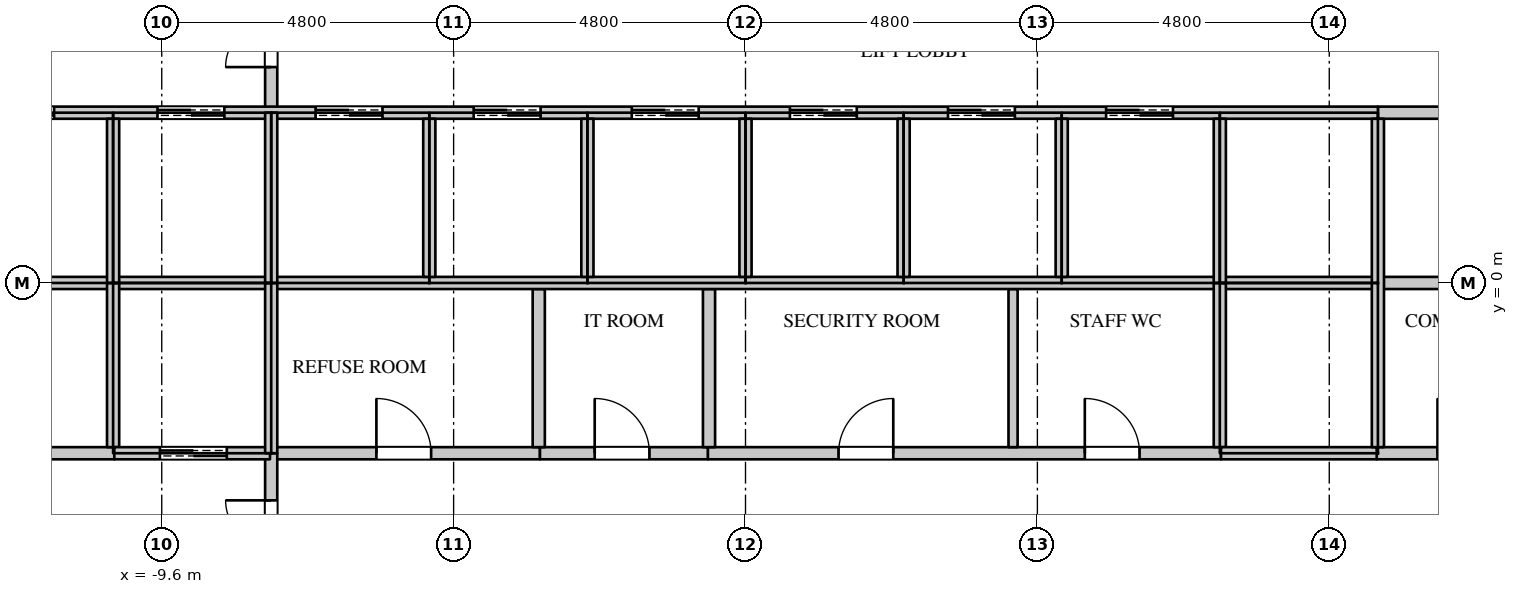
"""IFC4 building model, lengths in metres.
Left out: names, types, materials, properties, quantities, classifications, styles, units other than length and angle.
Written with IfcOpenShell. Run it as: python <this file> out.ifc"""

import sys

from ifc_helpers import new_model, si_unit, direction, frame, frame_2d, origin, place, context, subcontext, project, spatial, rectangle, extrude, element, fill, save


model = new_model("IFC4")
c1 = context("Model", 3, precision=1e-05, world=origin(), true_north=direction((0.0, 1.0)))
c2 = subcontext(c1, "Body", "Model", "MODEL_VIEW")
j1 = project(units=[si_unit("LENGTHUNIT", "METRE"), si_unit("PLANEANGLEUNIT", "RADIAN")], contexts=[c1])
p1 = place(None, origin())
s1 = spatial("IfcSite", under=j1, at=p1, CompositionType="ELEMENT")
p2 = place(p1, origin())
s2 = spatial("IfcBuilding", under=s1, at=p2, CompositionType="ELEMENT")
p3 = place(p2, frame((0.0, 0.0, 101.1)))
s3 = spatial("IfcBuildingStorey", under=s2, at=p3, CompositionType="ELEMENT", Elevation=101.1)
p4 = place(p3, frame((-7.82, -2.8, 0.0), z_axis=(0.0, 0.0, 1.0), x_axis=(1.0, 0.0, 0.0)))
e1 = element("IfcWall", 1, at=p4, inside=s3, PredefinedType="PARTITIONING", context=c2, shape_type="SweptSolid", body=[
    extrude(rectangle(XDim=4.44, YDim=0.2, at=frame_2d((2.22, 0.0))), origin(), (0.0, 0.0, 1.0), 5.15),
])
p5 = place(p4, frame((1.75, 0.0, 0.0)))
e2 = element("IfcOpeningElement", 2, at=p5, cuts=e1, PredefinedType="OPENING", context=c2, shape_type="SweptSolid", body=[
    extrude(rectangle(XDim=0.9, YDim=2.2, at=frame_2d((0.45, 1.1))), frame((0.0, 0.11, 0.0), z_axis=(0.0, -1.0, 0.0), x_axis=(1.0, 0.0, 0.0)), (0.0, 0.0, 1.0), 0.22),
])
p6 = place(p3, frame((-7.8, -8.075, 0.0), z_axis=(0.0, 0.0, 1.0), x_axis=(0.0, 1.0, 0.0)))
e3 = element("IfcWall", 3, at=p6, inside=s3, PredefinedType="PARTITIONING", context=c2, shape_type="SweptSolid", body=[
    extrude(rectangle(XDim=5.275, YDim=0.2, at=frame_2d((2.637, 0.0))), origin(), (0.0, 0.0, 1.0), 5.15),
])
p7 = place(p6, frame((3.0, 0.0, 0.0)))
e4 = element("IfcOpeningElement", 4, at=p7, cuts=e3, PredefinedType="OPENING", context=c2, shape_type="SweptSolid", body=[
    extrude(rectangle(XDim=1.5, YDim=2.4, at=frame_2d((0.75, 1.2))), frame((0.0, 0.11, 0.0), z_axis=(0.0, -1.0, 0.0), x_axis=(1.0, 0.0, 0.0)), (0.0, 0.0, 1.0), 0.22),
])
p8 = place(p3, frame((-7.8, 2.8, 0.0), z_axis=(0.0, 0.0, 1.0), x_axis=(0.0, 1.0, 0.0)))
e5 = element("IfcWall", 5, at=p8, inside=s3, PredefinedType="PARTITIONING", context=c2, shape_type="SweptSolid", body=[
    extrude(rectangle(XDim=5.275, YDim=0.2, at=frame_2d((2.637, 0.0))), origin(), (0.0, 0.0, 1.0), 5.15),
])
p9 = place(p8, frame((0.75, 0.0, 0.0)))
e6 = element("IfcOpeningElement", 6, at=p9, cuts=e5, PredefinedType="OPENING", context=c2, shape_type="SweptSolid", body=[
    extrude(rectangle(XDim=1.5, YDim=2.4, at=frame_2d((0.75, 1.2))), frame((0.0, 0.11, 0.0), z_axis=(0.0, -1.0, 0.0), x_axis=(1.0, 0.0, 0.0)), (0.0, 0.0, 1.0), 0.22),
])
p10 = place(p3, frame((-0.62, -2.8, 0.0), z_axis=(0.0, 0.0, 1.0), x_axis=(1.0, 0.0, 0.0)))
e7 = element("IfcWall", 7, at=p10, inside=s3, PredefinedType="PARTITIONING", context=c2, shape_type="SweptSolid", body=[
    extrude(rectangle(XDim=8.44, YDim=0.2, at=frame_2d((4.22, 0.0))), origin(), (0.0, 0.0, 1.0), 5.15),
])
p11 = place(p10, frame((2.15, 0.0, 0.0)))
e8 = element("IfcOpeningElement", 8, at=p11, cuts=e7, PredefinedType="OPENING", context=c2, shape_type="SweptSolid", body=[
    extrude(rectangle(XDim=0.9, YDim=2.2, at=frame_2d((0.45, 1.1))), frame((0.0, 0.11, 0.0), z_axis=(0.0, -1.0, 0.0), x_axis=(1.0, 0.0, 0.0)), (0.0, 0.0, 1.0), 0.22),
])
p12 = place(p10, frame((6.2, 0.0, 0.0)))
e9 = element("IfcOpeningElement", 9, at=p12, cuts=e7, PredefinedType="OPENING", context=c2, shape_type="SweptSolid", body=[
    extrude(rectangle(XDim=0.9, YDim=2.2, at=frame_2d((0.45, 1.1))), frame((0.0, 0.11, 0.0), z_axis=(0.0, -1.0, 0.0), x_axis=(1.0, 0.0, 0.0)), (0.0, 0.0, 1.0), 0.22),
])
p13 = place(p3, frame((4.4, -2.7, 0.0), z_axis=(0.0, 0.0, 1.0), x_axis=(0.0, 1.0, 0.0)))
e10 = element("IfcWall", 10, at=p13, inside=s3, PredefinedType="PARTITIONING", context=c2, shape_type="SweptSolid", body=[
    extrude(rectangle(XDim=2.6, YDim=0.15, at=frame_2d((1.3, 0.0))), origin(), (0.0, 0.0, 1.0), 5.15),
])
p14 = place(p3, frame((-13.37, -2.8, 0.0), z_axis=(0.0, 0.0, 1.0), x_axis=(1.0, 0.0, 0.0)))
e11 = element("IfcWall", 11, at=p14, inside=s3, PredefinedType="PARTITIONING", context=c2, shape_type="SweptSolid", body=[
    extrude(rectangle(XDim=2.99, YDim=0.2, at=frame_2d((1.495, 0.0))), origin(), (0.0, 0.0, 1.0), 5.15),
])
p15 = place(p14, frame((1.2, 0.0, 0.0)))
e12 = element("IfcOpeningElement", 12, at=p15, cuts=e11, PredefinedType="OPENING", context=c2, shape_type="SweptSolid", body=[
    extrude(rectangle(XDim=0.6, YDim=2.0, at=frame_2d((0.3, 1.0))), frame((0.0, 0.11, 0.0), z_axis=(0.0, -1.0, 0.0), x_axis=(1.0, 0.0, 0.0)), (0.0, 0.0, 1.0), 0.22),
])
p16 = place(p3, frame((-3.38, -2.8, 0.0), z_axis=(0.0, 0.0, 1.0), x_axis=(1.0, 0.0, 0.0)))
e13 = element("IfcWall", 13, at=p16, inside=s3, PredefinedType="PARTITIONING", context=c2, shape_type="SweptSolid", body=[
    extrude(rectangle(XDim=2.76, YDim=0.2, at=frame_2d((1.38, 0.0))), origin(), (0.0, 0.0, 1.0), 5.15),
])
p17 = place(p16, frame((0.9, 0.0, 0.0)))
e14 = element("IfcOpeningElement", 14, at=p17, cuts=e13, PredefinedType="OPENING", context=c2, shape_type="SweptSolid", body=[
    extrude(rectangle(XDim=0.9, YDim=2.2, at=frame_2d((0.45, 1.1))), frame((0.0, 0.11, 0.0), z_axis=(0.0, -1.0, 0.0), x_axis=(1.0, 0.0, 0.0)), (0.0, 0.0, 1.0), 0.22),
])
for number, where, z_axis, x_axis in (
    (15, (-3.4, -2.7, 0.0), (0.0, 0.0, 1.0), (0.0, 1.0, 0.0)),
    (16, (-0.6, -2.7, 0.0), (0.0, 0.0, 1.0), (0.0, 1.0, 0.0)),
):
    element("IfcWall", number, at=place(p3, frame(where, z_axis=z_axis, x_axis=x_axis)), inside=s3, PredefinedType="PARTITIONING", context=c2, shape_type="SweptSolid", body=[
        extrude(rectangle(XDim=2.6, YDim=0.2, at=frame_2d((1.3, 0.0))), origin(), (0.0, 0.0, 1.0), 5.15),
    ])
p18 = place(p3, frame((10.38, -2.8, 0.0), z_axis=(0.0, 0.0, 1.0), x_axis=(1.0, 0.0, 0.0)))
e17 = element("IfcWall", 17, at=p18, inside=s3, PredefinedType="PARTITIONING", context=c2, shape_type="SweptSolid", body=[
    extrude(rectangle(XDim=2.99, YDim=0.2, at=frame_2d((1.495, 0.0))), origin(), (0.0, 0.0, 1.0), 5.15),
])
p19 = place(p18, frame((1.0, 0.0, 0.0)))
e18 = element("IfcOpeningElement", 18, at=p19, cuts=e17, PredefinedType="OPENING", context=c2, shape_type="SweptSolid", body=[
    extrude(rectangle(XDim=0.9, YDim=2.2, at=frame_2d((0.45, 1.1))), frame((0.0, 0.11, 0.0), z_axis=(0.0, -1.0, 0.0), x_axis=(1.0, 0.0, 0.0)), (0.0, 0.0, 1.0), 0.22),
])
p20 = place(p3, frame((10.4, 2.8, 0.0), z_axis=(0.0, 0.0, 1.0), x_axis=(1.0, 0.0, 0.0)))
e19 = element("IfcWall", 19, at=p20, inside=s3, PredefinedType="PARTITIONING", context=c2, shape_type="SweptSolid", body=[
    extrude(rectangle(XDim=2.97, YDim=0.2, at=frame_2d((1.485, 0.0))), origin(), (0.0, 0.0, 1.0), 5.15),
])
p21 = place(p20, frame((1.2, 0.0, 0.0)))
e20 = element("IfcOpeningElement", 20, at=p21, cuts=e19, PredefinedType="OPENING", context=c2, shape_type="SweptSolid", body=[
    extrude(rectangle(XDim=0.6, YDim=2.0, at=frame_2d((0.3, 1.0))), frame((0.0, 0.11, 0.0), z_axis=(0.0, -1.0, 0.0), x_axis=(1.0, 0.0, 0.0)), (0.0, 0.0, 1.0), 0.22),
])
p22 = place(p3, frame((10.4, 0.0, 0.0), z_axis=(0.0, 0.0, 1.0), x_axis=(1.0, 0.0, 0.0)))
e21 = element("IfcWall", 21, at=p22, inside=s3, PredefinedType="PARTITIONING", context=c2, shape_type="SweptSolid", body=[
    extrude(rectangle(XDim=2.97, YDim=0.2, at=frame_2d((1.485, 0.0))), origin(), (0.0, 0.0, 1.0), 5.15),
])
p23 = place(p3, frame((-13.37, 0.0, 0.0), z_axis=(0.0, 0.0, 1.0), x_axis=(1.0, 0.0, 0.0)))
e22 = element("IfcWall", 22, at=p23, inside=s3, PredefinedType="PARTITIONING", context=c2, shape_type="SweptSolid", body=[
    extrude(rectangle(XDim=23.77, YDim=0.2, at=frame_2d((11.885, 0.0))), origin(), (0.0, 0.0, 1.0), 5.15),
])
p24 = place(p3, frame((-13.37, 2.8, 0.0), z_axis=(0.0, 0.0, 1.0), x_axis=(1.0, 0.0, 0.0)))
e23 = element("IfcWall", 23, at=p24, inside=s3, PredefinedType="PARTITIONING", context=c2, shape_type="SweptSolid", body=[
    extrude(rectangle(XDim=23.77, YDim=0.2, at=frame_2d((11.885, 0.0))), origin(), (0.0, 0.0, 1.0), 5.15),
])
p25 = place(p24, frame((0.9, 0.0, 0.0)))
e24 = element("IfcOpeningElement", 24, at=p25, cuts=e23, PredefinedType="OPENING", context=c2, shape_type="SweptSolid", body=[
    extrude(rectangle(XDim=1.1, YDim=2.2, at=frame_2d((0.55, 1.1))), frame((0.0, 0.11, 0.0), z_axis=(0.0, -1.0, 0.0), x_axis=(1.0, 0.0, 0.0)), (0.0, 0.0, 1.0), 0.22),
])
p26 = place(p24, frame((3.7, 0.0, 0.0)))
e25 = element("IfcOpeningElement", 25, at=p26, cuts=e23, PredefinedType="OPENING", context=c2, shape_type="SweptSolid", body=[
    extrude(rectangle(XDim=1.1, YDim=2.2, at=frame_2d((0.55, 1.1))), frame((0.0, 0.11, 0.0), z_axis=(0.0, -1.0, 0.0), x_axis=(1.0, 0.0, 0.0)), (0.0, 0.0, 1.0), 0.22),
])
p27 = place(p24, frame((6.3, 0.0, 0.0)))
e26 = element("IfcOpeningElement", 26, at=p27, cuts=e23, PredefinedType="OPENING", context=c2, shape_type="SweptSolid", body=[
    extrude(rectangle(XDim=1.1, YDim=2.2, at=frame_2d((0.55, 1.1))), frame((0.0, 0.11, 0.0), z_axis=(0.0, -1.0, 0.0), x_axis=(1.0, 0.0, 0.0)), (0.0, 0.0, 1.0), 0.22),
])
p28 = place(p24, frame((8.9, 0.0, 0.0)))
e27 = element("IfcOpeningElement", 27, at=p28, cuts=e23, PredefinedType="OPENING", context=c2, shape_type="SweptSolid", body=[
    extrude(rectangle(XDim=1.1, YDim=2.2, at=frame_2d((0.55, 1.1))), frame((0.0, 0.11, 0.0), z_axis=(0.0, -1.0, 0.0), x_axis=(1.0, 0.0, 0.0)), (0.0, 0.0, 1.0), 0.22),
])
p29 = place(p24, frame((11.5, 0.0, 0.0)))
e28 = element("IfcOpeningElement", 28, at=p29, cuts=e23, PredefinedType="OPENING", context=c2, shape_type="SweptSolid", body=[
    extrude(rectangle(XDim=1.1, YDim=2.2, at=frame_2d((0.55, 1.1))), frame((0.0, 0.11, 0.0), z_axis=(0.0, -1.0, 0.0), x_axis=(1.0, 0.0, 0.0)), (0.0, 0.0, 1.0), 0.22),
])
p30 = place(p24, frame((14.1, 0.0, 0.0)))
e29 = element("IfcOpeningElement", 29, at=p30, cuts=e23, PredefinedType="OPENING", context=c2, shape_type="SweptSolid", body=[
    extrude(rectangle(XDim=1.1, YDim=2.2, at=frame_2d((0.55, 1.1))), frame((0.0, 0.11, 0.0), z_axis=(0.0, -1.0, 0.0), x_axis=(1.0, 0.0, 0.0)), (0.0, 0.0, 1.0), 0.22),
])
p31 = place(p24, frame((16.7, 0.0, 0.0)))
e30 = element("IfcOpeningElement", 30, at=p31, cuts=e23, PredefinedType="OPENING", context=c2, shape_type="SweptSolid", body=[
    extrude(rectangle(XDim=1.1, YDim=2.2, at=frame_2d((0.55, 1.1))), frame((0.0, 0.11, 0.0), z_axis=(0.0, -1.0, 0.0), x_axis=(1.0, 0.0, 0.0)), (0.0, 0.0, 1.0), 0.22),
])
p32 = place(p24, frame((19.3, 0.0, 0.0)))
e31 = element("IfcOpeningElement", 31, at=p32, cuts=e23, PredefinedType="OPENING", context=c2, shape_type="SweptSolid", body=[
    extrude(rectangle(XDim=1.1, YDim=2.2, at=frame_2d((0.55, 1.1))), frame((0.0, 0.11, 0.0), z_axis=(0.0, -1.0, 0.0), x_axis=(1.0, 0.0, 0.0)), (0.0, 0.0, 1.0), 0.22),
])
p33 = place(p3, frame((-10.4, -2.7, 0.0), z_axis=(0.0, 0.0, 1.0), x_axis=(0.0, 1.0, 0.0)))
e32 = element("IfcWall", 32, at=p33, inside=s3, PredefinedType="PARTITIONING", context=c2, shape_type="SweptSolid", body=[
    extrude(rectangle(XDim=2.7, YDim=0.2, at=frame_2d((1.35, 0.0))), origin(), (0.0, 0.0, 1.0), 5.15),
])
p34 = place(p3, frame((-10.38, -2.8, 0.0), z_axis=(0.0, 0.0, 1.0), x_axis=(1.0, 0.0, 0.0)))
e33 = element("IfcWall", 33, at=p34, inside=s3, PredefinedType="PARTITIONING", context=c2, shape_type="SweptSolid", body=[
    extrude(rectangle(XDim=2.56, YDim=0.2, at=frame_2d((1.28, 0.0))), origin(), (0.0, 0.0, 1.0), 5.15),
])
p35 = place(p34, frame((0.75, 0.0, 0.0)))
e34 = element("IfcOpeningElement", 34, at=p35, cuts=e33, PredefinedType="OPENING", context=c2, shape_type="SweptSolid", body=[
    extrude(rectangle(XDim=1.1, YDim=2.2, at=frame_2d((0.55, 1.1))), frame((0.0, 0.11, 0.0), z_axis=(0.0, -1.0, 0.0), x_axis=(1.0, 0.0, 0.0)), (0.0, 0.0, 1.0), 0.22),
])
p36 = place(p3, frame((-10.4, 0.0, 0.0), z_axis=(0.0, 0.0, 1.0), x_axis=(0.0, 1.0, 0.0)))
e35 = element("IfcWall", 35, at=p36, inside=s3, PredefinedType="PARTITIONING", context=c2, shape_type="SweptSolid", body=[
    extrude(rectangle(XDim=2.7, YDim=0.2, at=frame_2d((1.35, 0.0))), origin(), (0.0, 0.0, 1.0), 5.15),
])
for number, where, z_axis, x_axis in (
    (36, (-7.8, -2.8, 0.0), (0.0, 0.0, 1.0), (0.0, 1.0, 0.0)),
    (37, (-7.8, 0.0, 0.0), (0.0, 0.0, 1.0), (0.0, 1.0, 0.0)),
):
    element("IfcWall", number, at=place(p3, frame(where, z_axis=z_axis, x_axis=x_axis)), inside=s3, PredefinedType="PARTITIONING", context=c2, shape_type="SweptSolid", body=[
        extrude(rectangle(XDim=2.8, YDim=0.2, at=frame_2d((1.4, 0.0))), origin(), (0.0, 0.0, 1.0), 5.15),
    ])
for number, where, z_axis, x_axis in (
    (38, (-5.2, 0.1, 0.0), (0.0, 0.0, 1.0), (0.0, 1.0, 0.0)),
    (39, (-2.6, 0.1, 0.0), (0.0, 0.0, 1.0), (0.0, 1.0, 0.0)),
    (40, (0.0, 0.1, 0.0), (0.0, 0.0, 1.0), (0.0, 1.0, 0.0)),
    (41, (2.6, 0.1, 0.0), (0.0, 0.0, 1.0), (0.0, 1.0, 0.0)),
    (42, (5.2, 0.1, 0.0), (0.0, 0.0, 1.0), (0.0, 1.0, 0.0)),
):
    element("IfcWall", number, at=place(p3, frame(where, z_axis=z_axis, x_axis=x_axis)), inside=s3, PredefinedType="PARTITIONING", context=c2, shape_type="SweptSolid", body=[
        extrude(rectangle(XDim=2.6, YDim=0.2, at=frame_2d((1.3, 0.0))), origin(), (0.0, 0.0, 1.0), 5.15),
    ])
p37 = place(p3, frame((7.8, -2.7, 0.0), z_axis=(0.0, 0.0, 1.0), x_axis=(0.0, 1.0, 0.0)))
e43 = element("IfcWall", 43, at=p37, inside=s3, PredefinedType="PARTITIONING", context=c2, shape_type="SweptSolid", body=[
    extrude(rectangle(XDim=2.7, YDim=0.2, at=frame_2d((1.35, 0.0))), origin(), (0.0, 0.0, 1.0), 5.15),
])
p38 = place(p3, frame((7.82, -2.8, 0.0), z_axis=(0.0, 0.0, 1.0), x_axis=(1.0, 0.0, 0.0)))
e44 = element("IfcWall", 44, at=p38, inside=s3, PredefinedType="PARTITIONING", context=c2, shape_type="SweptSolid", body=[
    extrude(rectangle(XDim=2.56, YDim=0.2, at=frame_2d((1.28, 0.0))), origin(), (0.0, 0.0, 1.0), 5.15),
])
p39 = place(p3, frame((7.8, 0.0, 0.0), z_axis=(0.0, 0.0, 1.0), x_axis=(0.0, 1.0, 0.0)))
e45 = element("IfcWall", 45, at=p39, inside=s3, PredefinedType="PARTITIONING", context=c2, shape_type="SweptSolid", body=[
    extrude(rectangle(XDim=2.7, YDim=0.2, at=frame_2d((1.35, 0.0))), origin(), (0.0, 0.0, 1.0), 5.15),
])
p40 = place(p3, frame((10.4, -2.7, 0.0), z_axis=(0.0, 0.0, 1.0), x_axis=(0.0, 1.0, 0.0)))
e46 = element("IfcWall", 46, at=p40, inside=s3, PredefinedType="PARTITIONING", context=c2, shape_type="SweptSolid", body=[
    extrude(rectangle(XDim=5.4, YDim=0.2, at=frame_2d((2.7, 0.0))), origin(), (0.0, 0.0, 1.0), 5.15),
])
p41 = place(p19, origin())
e47 = element("IfcDoor", 47, at=p41, inside=s3, OperationType="SINGLE_SWING_LEFT", PredefinedType="DOOR", context=c2, shape_type="SweptSolid", body=[
    extrude(rectangle(XDim=0.9, YDim=2.2, at=frame_2d((0.45, 1.1))), frame((0.0, 0.025, 0.0), z_axis=(0.0, -1.0, 0.0), x_axis=(1.0, 0.0, 0.0)), (0.0, 0.0, 1.0), 0.05),
])
fill(e18, e47)
p42 = place(p5, origin())
e48 = element("IfcDoor", 48, at=p42, inside=s3, OperationType="SINGLE_SWING_LEFT", PredefinedType="DOOR", context=c2, shape_type="SweptSolid", body=[
    extrude(rectangle(XDim=0.9, YDim=2.2, at=frame_2d((0.45, 1.1))), frame((0.0, 0.025, 0.0), z_axis=(0.0, -1.0, 0.0), x_axis=(1.0, 0.0, 0.0)), (0.0, 0.0, 1.0), 0.05),
])
fill(e2, e48)
p43 = place(p17, origin())
e49 = element("IfcDoor", 49, at=p43, inside=s3, OperationType="SINGLE_SWING_LEFT", PredefinedType="DOOR", context=c2, shape_type="SweptSolid", body=[
    extrude(rectangle(XDim=0.9, YDim=2.2, at=frame_2d((0.45, 1.1))), frame((0.0, 0.025, 0.0), z_axis=(0.0, -1.0, 0.0), x_axis=(1.0, 0.0, 0.0)), (0.0, 0.0, 1.0), 0.05),
])
fill(e14, e49)
p44 = place(p11, origin())
e50 = element("IfcDoor", 50, at=p44, inside=s3, OperationType="SINGLE_SWING_RIGHT", PredefinedType="DOOR", context=c2, shape_type="SweptSolid", body=[
    extrude(rectangle(XDim=0.9, YDim=2.2, at=frame_2d((0.45, 1.1))), frame((0.0, 0.025, 0.0), z_axis=(0.0, -1.0, 0.0), x_axis=(1.0, 0.0, 0.0)), (0.0, 0.0, 1.0), 0.05),
])
fill(e8, e50)
p45 = place(p12, origin())
e51 = element("IfcDoor", 51, at=p45, inside=s3, OperationType="SINGLE_SWING_LEFT", PredefinedType="DOOR", context=c2, shape_type="SweptSolid", body=[
    extrude(rectangle(XDim=0.9, YDim=2.2, at=frame_2d((0.45, 1.1))), frame((0.0, 0.025, 0.0), z_axis=(0.0, -1.0, 0.0), x_axis=(1.0, 0.0, 0.0)), (0.0, 0.0, 1.0), 0.05),
])
fill(e9, e51)
p46 = place(p25, origin())
e52 = element("IfcDoor", 52, at=p46, inside=s3, OperationType="DOUBLE_DOOR_SLIDING", PredefinedType="DOOR", context=c2, shape_type="SweptSolid", body=[
    extrude(rectangle(XDim=1.1, YDim=2.2, at=frame_2d((0.55, 1.1))), frame((0.0, 0.025, 0.0), z_axis=(0.0, -1.0, 0.0), x_axis=(1.0, 0.0, 0.0)), (0.0, 0.0, 1.0), 0.05),
])
fill(e24, e52)
p47 = place(p26, origin())
e53 = element("IfcDoor", 53, at=p47, inside=s3, OperationType="DOUBLE_DOOR_SLIDING", PredefinedType="DOOR", context=c2, shape_type="SweptSolid", body=[
    extrude(rectangle(XDim=1.1, YDim=2.2, at=frame_2d((0.55, 1.1))), frame((0.0, 0.025, 0.0), z_axis=(0.0, -1.0, 0.0), x_axis=(1.0, 0.0, 0.0)), (0.0, 0.0, 1.0), 0.05),
])
fill(e25, e53)
p48 = place(p35, origin())
e54 = element("IfcDoor", 54, at=p48, inside=s3, OperationType="DOUBLE_DOOR_SLIDING", PredefinedType="DOOR", context=c2, shape_type="SweptSolid", body=[
    extrude(rectangle(XDim=1.1, YDim=2.2, at=frame_2d((0.55, 1.1))), frame((0.0, 0.025, 0.0), z_axis=(0.0, -1.0, 0.0), x_axis=(1.0, 0.0, 0.0)), (0.0, 0.0, 1.0), 0.05),
])
fill(e34, e54)
p49 = place(p27, origin())
e55 = element("IfcDoor", 55, at=p49, inside=s3, OperationType="DOUBLE_DOOR_SLIDING", PredefinedType="DOOR", context=c2, shape_type="SweptSolid", body=[
    extrude(rectangle(XDim=1.1, YDim=2.2, at=frame_2d((0.55, 1.1))), frame((0.0, 0.025, 0.0), z_axis=(0.0, -1.0, 0.0), x_axis=(1.0, 0.0, 0.0)), (0.0, 0.0, 1.0), 0.05),
])
fill(e26, e55)
p50 = place(p28, origin())
e56 = element("IfcDoor", 56, at=p50, inside=s3, OperationType="DOUBLE_DOOR_SLIDING", PredefinedType="DOOR", context=c2, shape_type="SweptSolid", body=[
    extrude(rectangle(XDim=1.1, YDim=2.2, at=frame_2d((0.55, 1.1))), frame((0.0, 0.025, 0.0), z_axis=(0.0, -1.0, 0.0), x_axis=(1.0, 0.0, 0.0)), (0.0, 0.0, 1.0), 0.05),
])
fill(e27, e56)
p51 = place(p29, origin())
e57 = element("IfcDoor", 57, at=p51, inside=s3, OperationType="DOUBLE_DOOR_SLIDING", PredefinedType="DOOR", context=c2, shape_type="SweptSolid", body=[
    extrude(rectangle(XDim=1.1, YDim=2.2, at=frame_2d((0.55, 1.1))), frame((0.0, 0.025, 0.0), z_axis=(0.0, -1.0, 0.0), x_axis=(1.0, 0.0, 0.0)), (0.0, 0.0, 1.0), 0.05),
])
fill(e28, e57)
p52 = place(p30, origin())
e58 = element("IfcDoor", 58, at=p52, inside=s3, OperationType="DOUBLE_DOOR_SLIDING", PredefinedType="DOOR", context=c2, shape_type="SweptSolid", body=[
    extrude(rectangle(XDim=1.1, YDim=2.2, at=frame_2d((0.55, 1.1))), frame((0.0, 0.025, 0.0), z_axis=(0.0, -1.0, 0.0), x_axis=(1.0, 0.0, 0.0)), (0.0, 0.0, 1.0), 0.05),
])
fill(e29, e58)
p53 = place(p31, origin())
e59 = element("IfcDoor", 59, at=p53, inside=s3, OperationType="DOUBLE_DOOR_SLIDING", PredefinedType="DOOR", context=c2, shape_type="SweptSolid", body=[
    extrude(rectangle(XDim=1.1, YDim=2.2, at=frame_2d((0.55, 1.1))), frame((0.0, 0.025, 0.0), z_axis=(0.0, -1.0, 0.0), x_axis=(1.0, 0.0, 0.0)), (0.0, 0.0, 1.0), 0.05),
])
fill(e30, e59)
p54 = place(p32, origin())
e60 = element("IfcDoor", 60, at=p54, inside=s3, OperationType="DOUBLE_DOOR_SLIDING", PredefinedType="DOOR", context=c2, shape_type="SweptSolid", body=[
    extrude(rectangle(XDim=1.1, YDim=2.2, at=frame_2d((0.55, 1.1))), frame((0.0, 0.025, 0.0), z_axis=(0.0, -1.0, 0.0), x_axis=(1.0, 0.0, 0.0)), (0.0, 0.0, 1.0), 0.05),
])
fill(e31, e60)
p55 = place(p9, origin())
e61 = element("IfcDoor", 61, at=p55, inside=s3, OperationType="DOUBLE_DOOR_SINGLE_SWING", PredefinedType="DOOR", context=c2, shape_type="SweptSolid", body=[
    extrude(rectangle(XDim=1.5, YDim=2.4, at=frame_2d((0.75, 1.2))), frame((0.0, 0.025, 0.0), z_axis=(0.0, -1.0, 0.0), x_axis=(1.0, 0.0, 0.0)), (0.0, 0.0, 1.0), 0.05),
])
fill(e6, e61)
p56 = place(p7, origin())
e62 = element("IfcDoor", 62, at=p56, inside=s3, OperationType="DOUBLE_DOOR_SINGLE_SWING", PredefinedType="DOOR", context=c2, shape_type="SweptSolid", body=[
    extrude(rectangle(XDim=1.5, YDim=2.4, at=frame_2d((0.75, 1.2))), frame((0.0, 0.025, 0.0), z_axis=(0.0, -1.0, 0.0), x_axis=(1.0, 0.0, 0.0)), (0.0, 0.0, 1.0), 0.05),
])
fill(e4, e62)
save(model, sys.argv[1])
